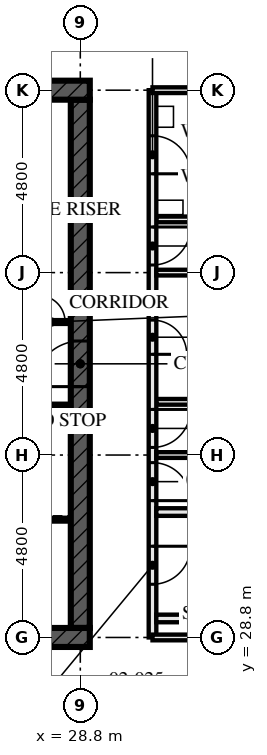
"""IFC4 building model, lengths in metres.
Left out: names, types, materials, properties, quantities, classifications, styles, units other than length and angle.
Written with IfcOpenShell. Run it as: python <this file> out.ifc"""

import sys

from ifc_helpers import new_model, si_unit, direction, frame, frame_2d, origin, place, context, subcontext, project, spatial, rectangle, extrude, element, fill, save


model = new_model("IFC4")
c1 = context("Model", 3, precision=1e-05, world=origin(), true_north=direction((0.0, 1.0)))
c2 = subcontext(c1, "Body", "Model", "MODEL_VIEW")
j1 = project(units=[si_unit("LENGTHUNIT", "METRE"), si_unit("PLANEANGLEUNIT", "RADIAN")], contexts=[c1])
p1 = place(None, origin())
s1 = spatial("IfcSite", under=j1, at=p1, CompositionType="ELEMENT")
p2 = place(p1, origin())
s2 = spatial("IfcBuilding", under=s1, at=p2, CompositionType="ELEMENT")
p3 = place(p2, frame((0.0, 0.0, 9.0)))
s3 = spatial("IfcBuildingStorey", under=s2, at=p3, CompositionType="ELEMENT", Elevation=9.0)
p4 = place(p3, frame((14.15, 28.8, -0.17), z_axis=(0.0, 0.0, 1.0), x_axis=(1.0, 0.0, 0.0)))
e1 = element("IfcWall", 1, at=p4, inside=s3, PredefinedType="SHEAR", context=c2, shape_type="SweptSolid", body=[
    extrude(rectangle(XDim=14.9, YDim=0.5, at=frame_2d((7.45, 0.0))), origin(), (0.0, 0.0, 1.0), 4.5),
])
p5 = place(p4, frame((6.85, 0.0, 0.17)))
e2 = element("IfcOpeningElement", 2, at=p5, cuts=e1, PredefinedType="OPENING", context=c2, shape_type="SweptSolid", body=[
    extrude(rectangle(XDim=1.2, YDim=2.1, at=frame_2d((0.6, 1.05))), frame((0.0, 0.26, 0.0), z_axis=(0.0, -1.0, 0.0), x_axis=(1.0, 0.0, 0.0)), (0.0, 0.0, 1.0), 0.521),
])
p6 = place(p3, frame((29.05, 43.2, -0.17), z_axis=(0.0, 0.0, 1.0), x_axis=(-1.0, 0.0, 0.0)))
e3 = element("IfcWall", 3, at=p6, inside=s3, PredefinedType="SHEAR", context=c2, shape_type="SweptSolid", body=[
    extrude(rectangle(XDim=14.9, YDim=0.5, at=frame_2d((7.45, 0.0))), origin(), (0.0, 0.0, 1.0), 4.5),
])
p7 = place(p6, frame((6.85, 0.0, 0.17)))
e4 = element("IfcOpeningElement", 4, at=p7, cuts=e3, PredefinedType="OPENING", context=c2, shape_type="SweptSolid", body=[
    extrude(rectangle(XDim=1.2, YDim=2.1, at=frame_2d((0.6, 1.05))), frame((0.0, 0.26, 0.0), z_axis=(0.0, -1.0, 0.0), x_axis=(1.0, 0.0, 0.0)), (0.0, 0.0, 1.0), 0.521),
])
p8 = place(p3, frame((28.8, 29.05, -0.17), z_axis=(0.0, 0.0, 1.0), x_axis=(0.0, 1.0, 0.0)))
e5 = element("IfcWall", 5, at=p8, inside=s3, PredefinedType="SHEAR", context=c2, shape_type="SweptSolid", body=[
    extrude(rectangle(XDim=13.9, YDim=0.5, at=frame_2d((6.95, 0.0))), origin(), (0.0, 0.0, 1.0), 4.5),
])
p9 = place(p8, frame((6.35, 0.0, 0.17)))
e6 = element("IfcOpeningElement", 6, at=p9, cuts=e5, PredefinedType="OPENING", context=c2, shape_type="SweptSolid", body=[
    extrude(rectangle(XDim=1.2, YDim=2.1, at=frame_2d((0.6, 1.05))), frame((0.0, 0.26, 0.0), z_axis=(0.0, -1.0, 0.0), x_axis=(1.0, 0.0, 0.0)), (0.0, 0.0, 1.0), 0.521),
])
for number, where, z_axis, x_axis in (
    (7, (35.5, 29.3, 0.0), (0.0, 0.0, 1.0), (-1.0, 0.0, 0.0)),
    (8, (35.5, 32.1, 0.0), (0.0, 0.0, 1.0), (-1.0, 0.0, 0.0)),
):
    element("IfcWall", number, at=place(p3, frame(where, z_axis=z_axis, x_axis=x_axis)), inside=s3, PredefinedType="SOLIDWALL", context=c2, shape_type="SweptSolid", body=[
        extrude(rectangle(XDim=4.7, YDim=0.2, at=frame_2d((2.35, 0.0))), origin(), (0.0, 0.0, 1.0), 3.99),
    ])
for number, where, z_axis, x_axis in (
    (9, (33.1, 35.0, 0.0), (0.0, 0.0, 1.0), (-1.0, 0.0, 0.0)),
    (10, (33.1, 39.8, 0.0), (0.0, 0.0, 1.0), (-1.0, 0.0, 0.0)),
):
    element("IfcWall", number, at=place(p3, frame(where, z_axis=z_axis, x_axis=x_axis)), inside=s3, PredefinedType="PARTITIONING", context=c2, shape_type="SweptSolid", body=[
        extrude(rectangle(XDim=2.3, YDim=0.15, at=frame_2d((1.15, 0.0))), origin(), (0.0, 0.0, 1.0), 4.33),
    ])
for number, where, z_axis, x_axis in (
    (11, (42.805, 33.6, 0.0), (0.0, 0.0, 1.0), (-1.0, 0.0, 0.0)),
    (12, (42.805, 38.4, 0.0), (0.0, 0.0, 1.0), (-1.0, 0.0, 0.0)),
):
    element("IfcWall", number, at=place(p3, frame(where, z_axis=z_axis, x_axis=x_axis)), inside=s3, PredefinedType="PARTITIONING", context=c2, shape_type="SweptSolid", body=[
        extrude(rectangle(XDim=12.005, YDim=0.15, at=frame_2d((6.002, 0.0))), origin(), (0.0, 0.0, 1.0), 3.55),
    ])
p10 = place(p3, frame((30.7, 28.8, 0.0), z_axis=(0.0, 0.0, 1.0), x_axis=(0.0, 1.0, 0.0)))
e13 = element("IfcWall", 13, at=p10, inside=s3, PredefinedType="PARTITIONING", context=c2, shape_type="SweptSolid", body=[
    extrude(rectangle(XDim=14.4, YDim=0.2, at=frame_2d((7.2, 0.0))), origin(), (0.0, 0.0, 1.0), 3.55),
])
p11 = place(p10, frame((1.4, 0.0, 0.0)))
e14 = element("IfcOpeningElement", 14, at=p11, cuts=e13, PredefinedType="OPENING", context=c2, shape_type="SweptSolid", body=[
    extrude(rectangle(XDim=1.0, YDim=2.1, at=frame_2d((0.5, 1.05))), frame((0.0, 0.111, 0.0), z_axis=(0.0, -1.0, 0.0), x_axis=(1.0, 0.0, 0.0)), (0.0, 0.0, 1.0), 0.221),
])
p12 = place(p10, frame((3.6, 0.0, 0.0)))
e15 = element("IfcOpeningElement", 15, at=p12, cuts=e13, PredefinedType="OPENING", context=c2, shape_type="SweptSolid", body=[
    extrude(rectangle(XDim=1.0, YDim=2.4, at=frame_2d((0.5, 1.2))), frame((0.0, 0.111, 0.0), z_axis=(0.0, -1.0, 0.0), x_axis=(1.0, 0.0, 0.0)), (0.0, 0.0, 1.0), 0.221),
])
p13 = place(p10, frame((5.0, 0.0, 0.0)))
e16 = element("IfcOpeningElement", 16, at=p13, cuts=e13, PredefinedType="OPENING", context=c2, shape_type="SweptSolid", body=[
    extrude(rectangle(XDim=1.0, YDim=2.4, at=frame_2d((0.5, 1.2))), frame((0.0, 0.111, 0.0), z_axis=(0.0, -1.0, 0.0), x_axis=(1.0, 0.0, 0.0)), (0.0, 0.0, 1.0), 0.221),
])
p14 = place(p10, frame((9.8, 0.0, 0.0)))
e17 = element("IfcOpeningElement", 17, at=p14, cuts=e13, PredefinedType="OPENING", context=c2, shape_type="SweptSolid", body=[
    extrude(rectangle(XDim=1.0, YDim=2.4, at=frame_2d((0.5, 1.2))), frame((0.0, 0.111, 0.0), z_axis=(0.0, -1.0, 0.0), x_axis=(1.0, 0.0, 0.0)), (0.0, 0.0, 1.0), 0.221),
])
p15 = place(p10, frame((7.45, 0.0, 0.0)))
e18 = element("IfcOpeningElement", 18, at=p15, cuts=e13, PredefinedType="OPENING", context=c2, shape_type="SweptSolid", body=[
    extrude(rectangle(XDim=0.9, YDim=2.1, at=frame_2d((0.45, 1.05))), frame((0.0, 0.111, 0.0), z_axis=(0.0, -1.0, 0.0), x_axis=(1.0, 0.0, 0.0)), (0.0, 0.0, 1.0), 0.221),
])
p16 = place(p10, frame((12.2, 0.0, 0.0)))
e19 = element("IfcOpeningElement", 19, at=p16, cuts=e13, PredefinedType="OPENING", context=c2, shape_type="SweptSolid", body=[
    extrude(rectangle(XDim=1.0, YDim=2.1, at=frame_2d((0.5, 1.05))), frame((0.0, 0.111, 0.0), z_axis=(0.0, -1.0, 0.0), x_axis=(1.0, 0.0, 0.0)), (0.0, 0.0, 1.0), 0.221),
])
p17 = place(p3, frame((23.05, 34.9, 0.0), z_axis=(0.0, 0.0, 1.0), x_axis=(1.0, 0.0, 0.0)))
e20 = element("IfcWall", 20, at=p17, inside=s3, PredefinedType="SOLIDWALL", context=c2, shape_type="SweptSolid", body=[
    extrude(rectangle(XDim=5.5, YDim=0.1, at=frame_2d((2.75, 0.0))), origin(), (0.0, 0.0, 1.0), 4.33),
])
p18 = place(p3, frame((22.65, 37.1, 0.0), z_axis=(0.0, 0.0, 1.0), x_axis=(1.0, 0.0, 0.0)))
e21 = element("IfcWall", 21, at=p18, inside=s3, PredefinedType="SOLIDWALL", context=c2, shape_type="SweptSolid", body=[
    extrude(rectangle(XDim=5.9, YDim=0.1, at=frame_2d((2.95, 0.0))), origin(), (0.0, 0.0, 1.0), 4.33),
])
p19 = place(p18, frame((3.45, 0.0, 0.0)))
e22 = element("IfcOpeningElement", 22, at=p19, cuts=e21, PredefinedType="OPENING", context=c2, shape_type="SweptSolid", body=[
    extrude(rectangle(XDim=1.0, YDim=2.1, at=frame_2d((0.5, 1.05))), frame((0.0, 0.061, 0.0), z_axis=(0.0, -1.0, 0.0), x_axis=(1.0, 0.0, 0.0)), (0.0, 0.0, 1.0), 0.121),
])
p20 = place(p18, frame((5.05, 0.0, 0.0)))
e23 = element("IfcOpeningElement", 23, at=p20, cuts=e21, PredefinedType="OPENING", context=c2, shape_type="SweptSolid", body=[
    extrude(rectangle(XDim=0.7, YDim=2.1, at=frame_2d((0.35, 1.05))), frame((0.0, 0.061, 0.0), z_axis=(0.0, -1.0, 0.0), x_axis=(1.0, 0.0, 0.0)), (0.0, 0.0, 1.0), 0.121),
])
p21 = place(p3, frame((23.15, 31.9, 0.0), z_axis=(0.0, 0.0, 1.0), x_axis=(1.0, 0.0, 0.0)))
e24 = element("IfcWall", 24, at=p21, inside=s3, PredefinedType="SOLIDWALL", context=c2, shape_type="SweptSolid", body=[
    extrude(rectangle(XDim=5.4, YDim=0.1, at=frame_2d((2.7, 0.0))), origin(), (0.0, 0.0, 1.0), 4.33),
])
for number, where, z_axis, x_axis in (
    (25, (33.205, 28.8, 0.0), (0.0, 0.0, 1.0), (-1.0, 0.0, 0.0)),
    (26, (33.205, 43.2, 0.0), (0.0, 0.0, 1.0), (-1.0, 0.0, 0.0)),
):
    element("IfcWall", number, at=place(p3, frame(where, z_axis=z_axis, x_axis=x_axis)), inside=s3, PredefinedType="PARTITIONING", context=c2, shape_type="SweptSolid", body=[
        extrude(rectangle(XDim=2.505, YDim=0.15, at=frame_2d((1.252, 0.0))), origin(), (0.0, 0.0, 1.0), 3.32),
    ])
p22 = place(p11, frame((1.0, 0.0, 0.0), z_axis=(0.0, 0.0, 1.0), x_axis=(-1.0, 0.0, 0.0)))
e27 = element("IfcDoor", 27, at=p22, inside=s3, OperationType="SINGLE_SWING_RIGHT", PredefinedType="DOOR", context=c2, shape_type="SweptSolid", body=[
    extrude(rectangle(XDim=1.0, YDim=2.1, at=frame_2d((0.5, 1.05))), frame((0.0, 0.032, 0.0), z_axis=(0.0, -1.0, 0.0), x_axis=(1.0, 0.0, 0.0)), (0.0, 0.0, 1.0), 0.064),
])
fill(e14, e27)
p23 = place(p12, frame((1.0, 0.0, 0.0), z_axis=(0.0, 0.0, 1.0), x_axis=(-1.0, 0.0, 0.0)))
e28 = element("IfcDoor", 28, at=p23, inside=s3, OperationType="SINGLE_SWING_LEFT", PredefinedType="DOOR", context=c2, shape_type="SweptSolid", body=[
    extrude(rectangle(XDim=1.0, YDim=2.4, at=frame_2d((0.5, 1.2))), frame((0.0, 0.027, 0.0), z_axis=(0.0, -1.0, 0.0), x_axis=(1.0, 0.0, 0.0)), (0.0, 0.0, 1.0), 0.054),
])
fill(e15, e28)
p24 = place(p13, frame((1.0, 0.0, 0.0), z_axis=(0.0, 0.0, 1.0), x_axis=(-1.0, 0.0, 0.0)))
e29 = element("IfcDoor", 29, at=p24, inside=s3, OperationType="SINGLE_SWING_RIGHT", PredefinedType="DOOR", context=c2, shape_type="SweptSolid", body=[
    extrude(rectangle(XDim=1.0, YDim=2.4, at=frame_2d((0.5, 1.2))), frame((0.0, 0.027, 0.0), z_axis=(0.0, -1.0, 0.0), x_axis=(1.0, 0.0, 0.0)), (0.0, 0.0, 1.0), 0.054),
])
fill(e16, e29)
p25 = place(p14, frame((1.0, 0.0, 0.0), z_axis=(0.0, 0.0, 1.0), x_axis=(-1.0, 0.0, 0.0)))
e30 = element("IfcDoor", 30, at=p25, inside=s3, OperationType="SINGLE_SWING_RIGHT", PredefinedType="DOOR", context=c2, shape_type="SweptSolid", body=[
    extrude(rectangle(XDim=1.0, YDim=2.4, at=frame_2d((0.5, 1.2))), frame((0.0, 0.027, 0.0), z_axis=(0.0, -1.0, 0.0), x_axis=(1.0, 0.0, 0.0)), (0.0, 0.0, 1.0), 0.054),
])
fill(e17, e30)
p26 = place(p15, frame((0.9, 0.0, 0.0), z_axis=(0.0, 0.0, 1.0), x_axis=(-1.0, 0.0, 0.0)))
e31 = element("IfcDoor", 31, at=p26, inside=s3, OperationType="SINGLE_SWING_LEFT", PredefinedType="DOOR", context=c2, shape_type="SweptSolid", body=[
    extrude(rectangle(XDim=0.9, YDim=2.1, at=frame_2d((0.45, 1.05))), frame((0.0, 0.027, 0.0), z_axis=(0.0, -1.0, 0.0), x_axis=(1.0, 0.0, 0.0)), (0.0, 0.0, 1.0), 0.054),
])
fill(e18, e31)
p27 = place(p16, frame((1.0, 0.0, 0.0), z_axis=(0.0, 0.0, 1.0), x_axis=(-1.0, 0.0, 0.0)))
e32 = element("IfcDoor", 32, at=p27, inside=s3, OperationType="SINGLE_SWING_LEFT", PredefinedType="DOOR", context=c2, shape_type="SweptSolid", body=[
    extrude(rectangle(XDim=1.0, YDim=2.1, at=frame_2d((0.5, 1.05))), frame((0.0, 0.027, 0.0), z_axis=(0.0, -1.0, 0.0), x_axis=(1.0, 0.0, 0.0)), (0.0, 0.0, 1.0), 0.054),
])
fill(e19, e32)
p28 = place(p20, origin())
e33 = element("IfcDoor", 33, at=p28, inside=s3, OperationType="SINGLE_SWING_RIGHT", PredefinedType="DOOR", context=c2, shape_type="SweptSolid", body=[
    extrude(rectangle(XDim=0.7, YDim=2.1, at=frame_2d((0.35, 1.05))), frame((0.0, 0.027, 0.0), z_axis=(0.0, -1.0, 0.0), x_axis=(1.0, 0.0, 0.0)), (0.0, 0.0, 1.0), 0.054),
])
fill(e23, e33)
p29 = place(p9, origin())
e34 = element("IfcDoor", 34, at=p29, inside=s3, OperationType="SINGLE_SWING_LEFT", PredefinedType="DOOR", context=c2, shape_type="SweptSolid", body=[
    extrude(rectangle(XDim=1.2, YDim=2.1, at=frame_2d((0.6, 1.05))), frame((0.0, 0.027, 0.0), z_axis=(0.0, -1.0, 0.0), x_axis=(1.0, 0.0, 0.0)), (0.0, 0.0, 1.0), 0.054),
])
fill(e6, e34)
save(model, sys.argv[1])
